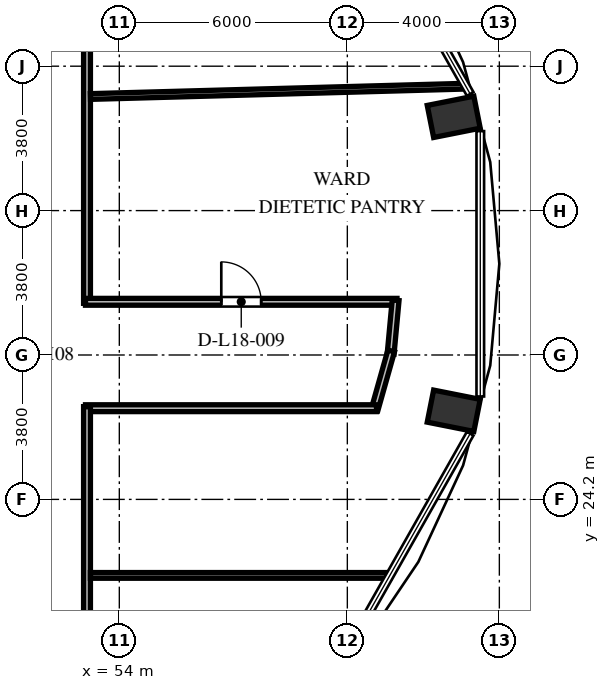
"""IFC4 building model, lengths in metres.
Left out: names, types, materials, properties, quantities, classifications, styles, units other than length and angle.
Written with IfcOpenShell. Run it as: python <this file> out.ifc"""

import sys

from ifc_helpers import new_model, si_unit, direction, frame, frame_2d, origin, origin_2d, place, context, subcontext, project, spatial, rectangle, extrude, element, fill, save


model = new_model("IFC4")
c1 = context("Model", 3, precision=1e-05, world=origin(), true_north=direction((0.0, 1.0)))
c2 = subcontext(c1, "Body", "Model", "MODEL_VIEW")
j1 = project(units=[si_unit("LENGTHUNIT", "METRE"), si_unit("PLANEANGLEUNIT", "RADIAN")], contexts=[c1])
p1 = place(None, origin())
s1 = spatial("IfcSite", under=j1, at=p1, CompositionType="ELEMENT")
p2 = place(p1, origin())
s2 = spatial("IfcBuilding", under=s1, at=p2, CompositionType="ELEMENT")
p3 = place(p2, frame((0.0, 0.0, 72.624)))
s3 = spatial("IfcBuildingStorey", under=s2, at=p3, CompositionType="ELEMENT", Elevation=72.624)
for number, where, z_axis, x_axis in (
    (1, (62.8, 26.532, 0.0), (0.0, 0.0, 1.0), (0.981, -0.195, 0.0)),
    (2, (62.8, 34.268, 0.0), (0.0, 0.0, 1.0), (0.981, 0.195, 0.0)),
):
    element("IfcColumn", number, at=place(p3, frame(where, z_axis=z_axis, x_axis=x_axis)), inside=s3, PredefinedType="COLUMN", context=c2, shape_type="SweptSolid", body=[
        extrude(rectangle(XDim=1.25, YDim=0.86, at=origin_2d()), origin(), (0.0, 0.0, 1.0), 3.648),
    ])
p4 = place(p3, frame((53.15, 38.79, 0.0), z_axis=(0.0, 0.0, 1.0), x_axis=(0.0, -1.0, 0.0)))
e3 = element("IfcWall", 3, at=p4, inside=s3, PredefinedType="PARTITIONING", context=c2, shape_type="SweptSolid", body=[
    extrude(rectangle(XDim=9.43, YDim=0.18, at=frame_2d((4.715, 0.0))), origin(), (0.0, 0.0, 1.0), 3.198),
])
p5 = place(p3, frame((53.11, 29.4, 0.0), z_axis=(0.0, 0.0, 1.0), x_axis=(1.0, 0.0, 0.0)))
e4 = element("IfcWall", 4, at=p5, inside=s3, PredefinedType="PARTITIONING", context=c2, shape_type="SweptSolid", body=[
    extrude(rectangle(XDim=8.197, YDim=0.18, at=frame_2d((4.098, 0.0))), origin(), (0.0, 0.0, 1.0), 3.198),
])
p6 = place(p5, frame((3.573, 0.0, 0.0)))
e5 = element("IfcOpeningElement", 5, at=p6, cuts=e4, PredefinedType="OPENING", context=c2, shape_type="SweptSolid", body=[
    extrude(rectangle(XDim=1.05, YDim=2.15, at=frame_2d((0.525, 1.075))), frame((0.0, 0.1, 0.0), z_axis=(0.0, -1.0, 0.0), x_axis=(1.0, 0.0, 0.0)), (0.0, 0.0, 1.0), 0.2),
])
p7 = place(p3, frame((61.271, 29.44, 0.0), z_axis=(0.0, 0.0, 1.0), x_axis=(-0.092539930621, -0.995708974169, 0.0)))
e6 = element("IfcWall", 6, at=p7, inside=s3, PredefinedType="PARTITIONING", context=c2, shape_type="SweptSolid", body=[
    extrude(rectangle(XDim=1.417, YDim=0.18, at=frame_2d((0.708, 0.0))), origin(), (0.0, 0.0, 1.0), 3.198),
])
p8 = place(p3, frame((61.154, 28.107, 0.0), z_axis=(0.0, 0.0, 1.0), x_axis=(-0.271748942561, -0.962368179138, 0.0)))
e7 = element("IfcWall", 7, at=p8, inside=s3, PredefinedType="PARTITIONING", context=c2, shape_type="SweptSolid", body=[
    extrude(rectangle(XDim=1.606, YDim=0.18, at=frame_2d((0.803, 0.0))), origin(), (0.0, 0.0, 1.0), 3.198),
])
p9 = place(p3, frame((60.768, 26.6, 0.0), z_axis=(0.0, 0.0, 1.0), x_axis=(-1.0, 0.0, 0.0)))
e8 = element("IfcWall", 8, at=p9, inside=s3, PredefinedType="PARTITIONING", context=c2, shape_type="SweptSolid", body=[
    extrude(rectangle(XDim=7.658, YDim=0.18, at=frame_2d((3.829, 0.0))), origin(), (0.0, 0.0, 1.0), 3.198),
])
p10 = place(p3, frame((53.15, 26.64, 0.0), z_axis=(0.0, 0.0, 1.0), x_axis=(0.0, -1.0, 0.0)))
e9 = element("IfcWall", 9, at=p10, inside=s3, PredefinedType="PARTITIONING", context=c2, shape_type="SweptSolid", body=[
    extrude(rectangle(XDim=6.66, YDim=0.18, at=frame_2d((3.33, 0.0))), origin(), (0.0, 0.0, 1.0), 3.198),
])
p11 = place(p3, frame((53.24, 22.2, 0.0), z_axis=(0.0, 0.0, 1.0), x_axis=(1.0, 0.0, 0.0)))
e10 = element("IfcWall", 10, at=p11, inside=s3, PredefinedType="PARTITIONING", context=c2, shape_type="SweptSolid", body=[
    extrude(rectangle(XDim=7.875, YDim=0.15, at=frame_2d((3.938, 0.0))), origin(), (0.0, 0.0, 1.0), 3.198),
])
p12 = place(p3, frame((53.24, 34.802, 0.0), z_axis=(0.0, 0.0, 1.0), x_axis=(0.999620561748, 0.027545099924, 0.0)))
e11 = element("IfcWall", 11, at=p12, inside=s3, PredefinedType="PARTITIONING", context=c2, shape_type="SweptSolid", body=[
    extrude(rectangle(XDim=9.891, YDim=0.15, at=frame_2d((4.946, 0.0))), origin(), (0.0, 0.0, 1.0), 2.583),
])
p13 = place(p6, origin())
e12 = element("IfcDoor", 12, at=p13, inside=s3, OperationType="SINGLE_SWING_LEFT", PredefinedType="DOOR", context=c2, shape_type="SweptSolid", body=[
    extrude(rectangle(XDim=1.05, YDim=2.15, at=frame_2d((0.525, 1.075))), frame((0.0, 0.025, 0.0), z_axis=(0.0, -1.0, 0.0), x_axis=(1.0, 0.0, 0.0)), (0.0, 0.0, 1.0), 0.05),
])
fill(e5, e12)
save(model, sys.argv[1])
